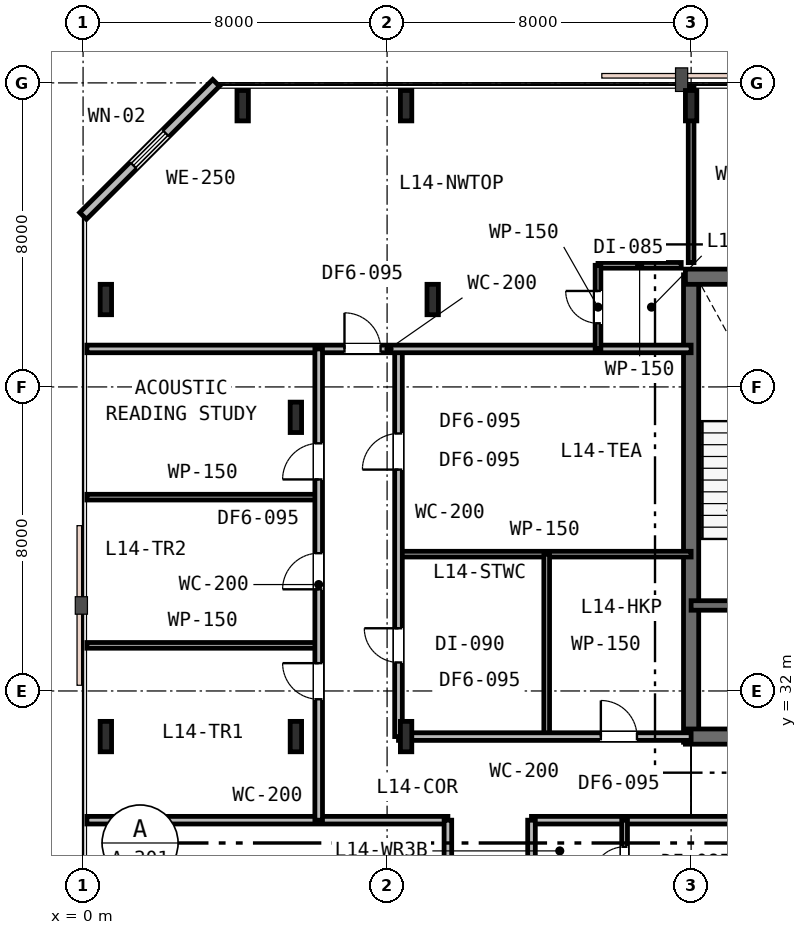
"""IFC4 building model, lengths in metres.
Left out: names, types, materials, properties, quantities, classifications, styles, units other than length and angle.
Written with IfcOpenShell. Run it as: python <this file> out.ifc"""

import sys

from ifc_helpers import new_model, si_unit, direction, frame, frame_2d, origin, origin_2d, place, context, subcontext, project, spatial, rectangle, i_section, extrude, element, fill, save


model = new_model("IFC4")
c1 = context("Model", 3, precision=1e-05, world=origin(), true_north=direction((0.0, 1.0)))
c2 = subcontext(c1, "Body", "Model", "MODEL_VIEW")
j1 = project(units=[si_unit("LENGTHUNIT", "METRE"), si_unit("PLANEANGLEUNIT", "RADIAN")], contexts=[c1])
p1 = place(None, origin())
s1 = spatial("IfcSite", under=j1, at=p1, CompositionType="ELEMENT")
p2 = place(p1, origin())
s2 = spatial("IfcBuilding", under=s1, at=p2, CompositionType="ELEMENT")
p3 = place(p2, frame((0.0, 0.0, 58.2)))
s3 = spatial("IfcBuildingStorey", under=s2, at=p3, CompositionType="ELEMENT", Elevation=58.2)
p4 = place(p3, frame((16.0, 30.65, 0.0), z_axis=(0.0, 0.0, 1.0), x_axis=(0.0, 1.0, 0.0)))
e1 = element("IfcWall", 1, at=p4, inside=s3, PredefinedType="SHEAR", context=c2, shape_type="SweptSolid", body=[
    extrude(rectangle(XDim=12.3, YDim=0.4, at=frame_2d((6.15, 0.0))), origin(), (0.0, 0.0, 1.0), 3.6),
])
p5 = place(p3, frame((15.85, 42.9, 0.0), z_axis=(0.0, 0.0, 1.0), x_axis=(1.0, 0.0, 0.0)))
e2 = element("IfcWall", 2, at=p5, inside=s3, PredefinedType="SHEAR", context=c2, shape_type="SweptSolid", body=[
    extrude(rectangle(XDim=24.3, YDim=0.4, at=frame_2d((12.15, 0.0))), origin(), (0.0, 0.0, 1.0), 3.6),
])
p6 = place(p3, frame((15.85, 30.8, 0.0), z_axis=(0.0, 0.0, 1.0), x_axis=(1.0, 0.0, 0.0)))
e3 = element("IfcWall", 3, at=p6, inside=s3, PredefinedType="SHEAR", context=c2, shape_type="SweptSolid", body=[
    extrude(rectangle(XDim=11.2, YDim=0.4, at=frame_2d((5.6, 0.0))), origin(), (0.0, 0.0, 1.0), 3.6),
])
p7 = place(p6, frame((2.45, 0.0, 0.0)))
e4 = element("IfcOpeningElement", 4, at=p7, cuts=e3, PredefinedType="OPENING", context=c2, shape_type="SweptSolid", body=[
    extrude(rectangle(XDim=1.1, YDim=2.15, at=frame_2d((0.55, 1.075))), frame((0.0, 0.21, 0.0), z_axis=(0.0, -1.0, 0.0), x_axis=(1.0, 0.0, 0.0)), (0.0, 0.0, 1.0), 0.42),
])
p8 = place(p3, frame((16.0, 34.25, 0.0), z_axis=(0.0, 0.0, 1.0), x_axis=(1.0, 0.0, 0.0)))
e5 = element("IfcWall", 5, at=p8, inside=s3, PredefinedType="SHEAR", context=c2, shape_type="SweptSolid", body=[
    extrude(rectangle(XDim=6.05, YDim=0.25, at=frame_2d((3.025, 0.0))), origin(), (0.0, 0.0, 1.0), 3.6),
])
p9 = place(p8, frame((1.25, 0.0, 0.0)))
e6 = element("IfcOpeningElement", 6, at=p9, cuts=e5, PredefinedType="OPENING", context=c2, shape_type="SweptSolid", body=[
    extrude(rectangle(XDim=1.0, YDim=2.15, at=frame_2d((0.5, 1.075))), frame((0.0, 0.135, 0.0), z_axis=(0.0, -1.0, 0.0), x_axis=(1.0, 0.0, 0.0)), (0.0, 0.0, 1.0), 0.27),
])
p10 = place(p8, frame((4.2, 0.0, 0.0)))
e7 = element("IfcOpeningElement", 7, at=p10, cuts=e5, PredefinedType="OPENING", context=c2, shape_type="SweptSolid", body=[
    extrude(rectangle(XDim=1.1, YDim=2.15, at=frame_2d((0.55, 1.075))), frame((0.0, 0.135, 0.0), z_axis=(0.0, -1.0, 0.0), x_axis=(1.0, 0.0, 0.0)), (0.0, 0.0, 1.0), 0.27),
])
for number, where, z_axis, x_axis in (
    (8, (5.6, 30.8, 0.0), (0.0, 0.0, 1.0), (1.0, 0.0, 0.0)),
    (9, (5.6, 39.2, 0.0), (0.0, 0.0, 1.0), (1.0, 0.0, 0.0)),
    (10, (8.5, 30.8, 0.0), (0.0, 0.0, 1.0), (1.0, 0.0, 0.0)),
    (11, (9.2, 42.3, 0.0), (0.0, 0.0, 1.0), (1.0, 0.0, 0.0)),
    (12, (0.6, 30.8, 0.0), (0.0, 0.0, 1.0), (1.0, 0.0, 0.0)),
    (13, (0.6, 42.3, 0.0), (0.0, 0.0, 1.0), (1.0, 0.0, 0.0)),
    (14, (4.2, 47.4, 0.0), (0.0, 0.0, 1.0), (1.0, 0.0, 0.0)),
    (15, (8.5, 47.4, 0.0), (0.0, 0.0, 1.0), (1.0, 0.0, 0.0)),
    (16, (16.0, 47.4, 0.0), (0.0, 0.0, 1.0), (1.0, 0.0, 0.0)),
):
    element("IfcColumn", number, at=place(p3, frame(where, z_axis=z_axis, x_axis=x_axis)), inside=s3, PredefinedType="COLUMN", context=c2, shape_type="SweptSolid", body=[
        extrude(i_section(OverallWidth=0.3, OverallDepth=0.8, WebThickness=0.018, FlangeThickness=0.033, FilletRadius=0.03, at=origin_2d()), origin(), (0.0, 0.0, 1.0), 3.6),
    ])
p11 = place(p3, frame((3.5, 48.0, 0.0), z_axis=(0.0, 0.0, 1.0), x_axis=(-0.707106781187, -0.707106781187, 0.0)))
e17 = element("IfcWall", 17, at=p11, inside=s3, PredefinedType="STANDARD", context=c2, shape_type="SweptSolid", body=[
    extrude(rectangle(XDim=4.95, YDim=0.25, at=frame_2d((2.475, 0.0))), origin(), (0.0, 0.0, 1.0), 3.33),
])
p12 = place(p11, frame((1.875, 0.0, 0.85)))
e18 = element("IfcOpeningElement", 18, at=p12, cuts=e17, PredefinedType="OPENING", context=c2, shape_type="SweptSolid", body=[
    extrude(rectangle(XDim=1.2, YDim=1.6, at=frame_2d((0.6, 0.8))), frame((0.0, 0.135, 0.0), z_axis=(0.0, -1.0, 0.0), x_axis=(1.0, 0.0, 0.0)), (0.0, 0.0, 1.0), 0.27),
])
p13 = place(p3, frame((0.1, 28.6, 0.0), z_axis=(0.0, 0.0, 1.0), x_axis=(1.0, 0.0, 0.0)))
e19 = element("IfcWall", 19, at=p13, inside=s3, PredefinedType="PARTITIONING", context=c2, shape_type="SweptSolid", body=[
    extrude(rectangle(XDim=9.5, YDim=0.2, at=frame_2d((4.75, 0.0))), origin(), (0.0, 0.0, 1.0), 2.82),
])
p14 = place(p3, frame((11.8, 28.6, 0.0), z_axis=(0.0, 0.0, 1.0), x_axis=(1.0, 0.0, 0.0)))
e20 = element("IfcWall", 20, at=p14, inside=s3, PredefinedType="PARTITIONING", context=c2, shape_type="SweptSolid", body=[
    extrude(rectangle(XDim=38.6, YDim=0.2, at=frame_2d((19.3, 0.0))), origin(), (0.0, 0.0, 1.0), 2.82),
])
p15 = place(p14, frame((14.3, 0.0, 0.0)))
e21 = element("IfcOpeningElement", 21, at=p15, cuts=e20, PredefinedType="OPENING", context=c2, shape_type="SweptSolid", body=[
    extrude(rectangle(XDim=0.95, YDim=2.15, at=frame_2d((0.475, 1.075))), frame((0.0, 0.11, 0.0), z_axis=(0.0, -1.0, 0.0), x_axis=(1.0, 0.0, 0.0)), (0.0, 0.0, 1.0), 0.22),
])
p16 = place(p14, frame((22.075, 0.0, 0.0)))
e22 = element("IfcOpeningElement", 22, at=p16, cuts=e20, PredefinedType="OPENING", context=c2, shape_type="SweptSolid", body=[
    extrude(rectangle(XDim=0.95, YDim=2.15, at=frame_2d((0.475, 1.075))), frame((0.0, 0.11, 0.0), z_axis=(0.0, -1.0, 0.0), x_axis=(1.0, 0.0, 0.0)), (0.0, 0.0, 1.0), 0.22),
])
p17 = place(p14, frame((28.829, 0.0, 0.0)))
e23 = element("IfcOpeningElement", 23, at=p17, cuts=e20, PredefinedType="OPENING", context=c2, shape_type="SweptSolid", body=[
    extrude(rectangle(XDim=0.95, YDim=2.15, at=frame_2d((0.475, 1.075))), frame((0.0, 0.11, 0.0), z_axis=(0.0, -1.0, 0.0), x_axis=(1.0, 0.0, 0.0)), (0.0, 0.0, 1.0), 0.22),
])
p18 = place(p14, frame((34.669, 0.0, 0.0)))
e24 = element("IfcOpeningElement", 24, at=p18, cuts=e20, PredefinedType="OPENING", context=c2, shape_type="SweptSolid", body=[
    extrude(rectangle(XDim=0.95, YDim=2.15, at=frame_2d((0.475, 1.075))), frame((0.0, 0.11, 0.0), z_axis=(0.0, -1.0, 0.0), x_axis=(1.0, 0.0, 0.0)), (0.0, 0.0, 1.0), 0.22),
])
p19 = place(p3, frame((8.3, 35.6, 0.0), z_axis=(0.0, 0.0, 1.0), x_axis=(1.0, 0.0, 0.0)))
e25 = element("IfcWall", 25, at=p19, inside=s3, PredefinedType="PARTITIONING", context=c2, shape_type="SweptSolid", body=[
    extrude(rectangle(XDim=7.7, YDim=0.15, at=frame_2d((3.85, 0.0))), origin(), (0.0, 0.0, 1.0), 2.82),
])
p20 = place(p3, frame((12.2, 30.8, 0.0), z_axis=(0.0, 0.0, 1.0), x_axis=(0.0, 1.0, 0.0)))
e26 = element("IfcWall", 26, at=p20, inside=s3, PredefinedType="PARTITIONING", context=c2, shape_type="SweptSolid", body=[
    extrude(rectangle(XDim=4.8, YDim=0.15, at=frame_2d((2.4, 0.0))), origin(), (0.0, 0.0, 1.0), 2.82),
])
p21 = place(p3, frame((8.3, 30.8, 0.0), z_axis=(0.0, 0.0, 1.0), x_axis=(1.0, 0.0, 0.0)))
e27 = element("IfcWall", 27, at=p21, inside=s3, PredefinedType="PARTITIONING", context=c2, shape_type="SweptSolid", body=[
    extrude(rectangle(XDim=7.7, YDim=0.2, at=frame_2d((3.85, 0.0))), origin(), (0.0, 0.0, 1.0), 2.82),
])
p22 = place(p21, frame((5.325, 0.0, 0.0)))
e28 = element("IfcOpeningElement", 28, at=p22, cuts=e27, PredefinedType="OPENING", context=c2, shape_type="SweptSolid", body=[
    extrude(rectangle(XDim=0.95, YDim=2.15, at=frame_2d((0.475, 1.075))), frame((0.0, 0.11, 0.0), z_axis=(0.0, -1.0, 0.0), x_axis=(1.0, 0.0, 0.0)), (0.0, 0.0, 1.0), 0.22),
])
p23 = place(p3, frame((8.3, 30.8, 0.0), z_axis=(0.0, 0.0, 1.0), x_axis=(0.0, 1.0, 0.0)))
e29 = element("IfcWall", 29, at=p23, inside=s3, PredefinedType="PARTITIONING", context=c2, shape_type="SweptSolid", body=[
    extrude(rectangle(XDim=10.2, YDim=0.2, at=frame_2d((5.1, 0.0))), origin(), (0.0, 0.0, 1.0), 2.82),
])
p24 = place(p23, frame((1.95, 0.0, 0.0)))
e30 = element("IfcOpeningElement", 30, at=p24, cuts=e29, PredefinedType="OPENING", context=c2, shape_type="SweptSolid", body=[
    extrude(rectangle(XDim=0.9, YDim=2.15, at=frame_2d((0.45, 1.075))), frame((0.0, 0.11, 0.0), z_axis=(0.0, -1.0, 0.0), x_axis=(1.0, 0.0, 0.0)), (0.0, 0.0, 1.0), 0.22),
])
p25 = place(p23, frame((7.025, 0.0, 0.0)))
e31 = element("IfcOpeningElement", 31, at=p25, cuts=e29, PredefinedType="OPENING", context=c2, shape_type="SweptSolid", body=[
    extrude(rectangle(XDim=0.95, YDim=2.15, at=frame_2d((0.475, 1.075))), frame((0.0, 0.11, 0.0), z_axis=(0.0, -1.0, 0.0), x_axis=(1.0, 0.0, 0.0)), (0.0, 0.0, 1.0), 0.22),
])
p26 = place(p3, frame((0.1, 41.0, 0.0), z_axis=(0.0, 0.0, 1.0), x_axis=(1.0, 0.0, 0.0)))
e32 = element("IfcWall", 32, at=p26, inside=s3, PredefinedType="PARTITIONING", context=c2, shape_type="SweptSolid", body=[
    extrude(rectangle(XDim=15.9, YDim=0.2, at=frame_2d((7.95, 0.0))), origin(), (0.0, 0.0, 1.0), 2.82),
])
p27 = place(p26, frame((6.779, 0.0, 0.0)))
e33 = element("IfcOpeningElement", 33, at=p27, cuts=e32, PredefinedType="OPENING", context=c2, shape_type="SweptSolid", body=[
    extrude(rectangle(XDim=0.95, YDim=2.15, at=frame_2d((0.475, 1.075))), frame((0.0, 0.11, 0.0), z_axis=(0.0, -1.0, 0.0), x_axis=(1.0, 0.0, 0.0)), (0.0, 0.0, 1.0), 0.22),
])
p28 = place(p3, frame((13.55, 43.2, 0.0), z_axis=(0.0, 0.0, 1.0), x_axis=(1.0, 0.0, 0.0)))
e34 = element("IfcWall", 34, at=p28, inside=s3, PredefinedType="PARTITIONING", context=c2, shape_type="SweptSolid", body=[
    extrude(rectangle(XDim=2.19, YDim=0.15, at=frame_2d((1.095, 0.0))), origin(), (0.0, 0.0, 1.0), 3.33),
])
p29 = place(p3, frame((13.55, 41.0, 0.0), z_axis=(0.0, 0.0, 1.0), x_axis=(0.0, 1.0, 0.0)))
e35 = element("IfcWall", 35, at=p29, inside=s3, PredefinedType="PARTITIONING", context=c2, shape_type="SweptSolid", body=[
    extrude(rectangle(XDim=2.2, YDim=0.15, at=frame_2d((1.1, 0.0))), origin(), (0.0, 0.0, 1.0), 3.33),
])
p30 = place(p29, frame((0.675, 0.0, 0.0)))
e36 = element("IfcOpeningElement", 36, at=p30, cuts=e35, PredefinedType="OPENING", context=c2, shape_type="SweptSolid", body=[
    extrude(rectangle(XDim=0.85, YDim=2.15, at=frame_2d((0.425, 1.075))), frame((0.0, 0.085, 0.0), z_axis=(0.0, -1.0, 0.0), x_axis=(1.0, 0.0, 0.0)), (0.0, 0.0, 1.0), 0.17),
])
for number, where, z_axis, x_axis in (
    (37, (0.1, 33.2, 0.0), (0.0, 0.0, 1.0), (1.0, 0.0, 0.0)),
    (38, (0.1, 37.1, 0.0), (0.0, 0.0, 1.0), (1.0, 0.0, 0.0)),
):
    element("IfcWall", number, at=place(p3, frame(where, z_axis=z_axis, x_axis=x_axis)), inside=s3, PredefinedType="PARTITIONING", context=c2, shape_type="SweptSolid", body=[
        extrude(rectangle(XDim=6.1, YDim=0.15, at=frame_2d((3.05, 0.0))), origin(), (0.0, 0.0, 1.0), 2.82),
    ])
p31 = place(p3, frame((6.2, 28.6, 0.0), z_axis=(0.0, 0.0, 1.0), x_axis=(0.0, 1.0, 0.0)))
e39 = element("IfcWall", 39, at=p31, inside=s3, PredefinedType="PARTITIONING", context=c2, shape_type="SweptSolid", body=[
    extrude(rectangle(XDim=12.4, YDim=0.2, at=frame_2d((6.2, 0.0))), origin(), (0.0, 0.0, 1.0), 2.82),
])
p32 = place(p31, frame((3.182, 0.0, 0.0)))
e40 = element("IfcOpeningElement", 40, at=p32, cuts=e39, PredefinedType="OPENING", context=c2, shape_type="SweptSolid", body=[
    extrude(rectangle(XDim=0.95, YDim=2.15, at=frame_2d((0.475, 1.075))), frame((0.0, 0.11, 0.0), z_axis=(0.0, -1.0, 0.0), x_axis=(1.0, 0.0, 0.0)), (0.0, 0.0, 1.0), 0.22),
])
p33 = place(p31, frame((6.075, 0.0, 0.0)))
e41 = element("IfcOpeningElement", 41, at=p33, cuts=e39, PredefinedType="OPENING", context=c2, shape_type="SweptSolid", body=[
    extrude(rectangle(XDim=0.95, YDim=2.15, at=frame_2d((0.475, 1.075))), frame((0.0, 0.11, 0.0), z_axis=(0.0, -1.0, 0.0), x_axis=(1.0, 0.0, 0.0)), (0.0, 0.0, 1.0), 0.22),
])
p34 = place(p31, frame((8.966, 0.0, 0.0)))
e42 = element("IfcOpeningElement", 42, at=p34, cuts=e39, PredefinedType="OPENING", context=c2, shape_type="SweptSolid", body=[
    extrude(rectangle(XDim=0.95, YDim=2.15, at=frame_2d((0.475, 1.075))), frame((0.0, 0.11, 0.0), z_axis=(0.0, -1.0, 0.0), x_axis=(1.0, 0.0, 0.0)), (0.0, 0.0, 1.0), 0.22),
])
p35 = place(p3, frame((16.0, 43.27, 0.0), z_axis=(0.0, 0.0, 1.0), x_axis=(0.0, 1.0, 0.0)))
e43 = element("IfcWall", 43, at=p35, inside=s3, PredefinedType="PARTITIONING", context=c2, shape_type="SweptSolid", body=[
    extrude(rectangle(XDim=4.63, YDim=0.15, at=frame_2d((2.315, 0.0))), origin(), (0.0, 0.0, 1.0), 2.93),
])
p36 = place(p3, frame((9.6, 5.6, 0.0), z_axis=(0.0, 0.0, 1.0), x_axis=(0.0, 1.0, 0.0)))
e44 = element("IfcWall", 44, at=p36, inside=s3, PredefinedType="PARTITIONING", context=c2, shape_type="SweptSolid", body=[
    extrude(rectangle(XDim=23.0, YDim=0.2, at=frame_2d((11.5, 0.0))), origin(), (0.0, 0.0, 1.0), 2.82),
])
p37 = place(p36, frame((4.27, 0.0, 0.0)))
e45 = element("IfcOpeningElement", 45, at=p37, cuts=e44, PredefinedType="OPENING", context=c2, shape_type="SweptSolid", body=[
    extrude(rectangle(XDim=0.95, YDim=2.15, at=frame_2d((0.475, 1.075))), frame((0.0, 0.11, 0.0), z_axis=(0.0, -1.0, 0.0), x_axis=(1.0, 0.0, 0.0)), (0.0, 0.0, 1.0), 0.22),
])
p38 = place(p36, frame((10.17, 0.0, 0.0)))
e46 = element("IfcOpeningElement", 46, at=p38, cuts=e44, PredefinedType="OPENING", context=c2, shape_type="SweptSolid", body=[
    extrude(rectangle(XDim=0.95, YDim=2.15, at=frame_2d((0.475, 1.075))), frame((0.0, 0.11, 0.0), z_axis=(0.0, -1.0, 0.0), x_axis=(1.0, 0.0, 0.0)), (0.0, 0.0, 1.0), 0.22),
])
p39 = place(p36, frame((19.693, 0.0, 0.0)))
e47 = element("IfcOpeningElement", 47, at=p39, cuts=e44, PredefinedType="OPENING", context=c2, shape_type="SweptSolid", body=[
    extrude(rectangle(XDim=0.95, YDim=2.15, at=frame_2d((0.475, 1.075))), frame((0.0, 0.11, 0.0), z_axis=(0.0, -1.0, 0.0), x_axis=(1.0, 0.0, 0.0)), (0.0, 0.0, 1.0), 0.22),
])
p40 = place(p3, frame((11.8, 5.6, 0.0), z_axis=(0.0, 0.0, 1.0), x_axis=(0.0, 1.0, 0.0)))
e48 = element("IfcWall", 48, at=p40, inside=s3, PredefinedType="PARTITIONING", context=c2, shape_type="SweptSolid", body=[
    extrude(rectangle(XDim=23.0, YDim=0.2, at=frame_2d((11.5, 0.0))), origin(), (0.0, 0.0, 1.0), 2.82),
])
p41 = place(p40, frame((2.19, 0.0, 0.0)))
e49 = element("IfcOpeningElement", 49, at=p41, cuts=e48, PredefinedType="OPENING", context=c2, shape_type="SweptSolid", body=[
    extrude(rectangle(XDim=0.95, YDim=2.15, at=frame_2d((0.475, 1.075))), frame((0.0, 0.11, 0.0), z_axis=(0.0, -1.0, 0.0), x_axis=(1.0, 0.0, 0.0)), (0.0, 0.0, 1.0), 0.22),
])
p42 = place(p40, frame((9.92, 0.0, 0.0)))
e50 = element("IfcOpeningElement", 50, at=p42, cuts=e48, PredefinedType="OPENING", context=c2, shape_type="SweptSolid", body=[
    extrude(rectangle(XDim=0.95, YDim=2.15, at=frame_2d((0.475, 1.075))), frame((0.0, 0.11, 0.0), z_axis=(0.0, -1.0, 0.0), x_axis=(1.0, 0.0, 0.0)), (0.0, 0.0, 1.0), 0.22),
])
p43 = place(p40, frame((17.41, 0.0, 0.0)))
e51 = element("IfcOpeningElement", 51, at=p43, cuts=e48, PredefinedType="OPENING", context=c2, shape_type="SweptSolid", body=[
    extrude(rectangle(XDim=0.95, YDim=2.15, at=frame_2d((0.475, 1.075))), frame((0.0, 0.11, 0.0), z_axis=(0.0, -1.0, 0.0), x_axis=(1.0, 0.0, 0.0)), (0.0, 0.0, 1.0), 0.22),
])
p44 = place(p3, frame((14.25, 26.35, 0.0), z_axis=(0.0, 0.0, 1.0), x_axis=(0.0, 1.0, 0.0)))
e52 = element("IfcWall", 52, at=p44, inside=s3, PredefinedType="PARTITIONING", context=c2, shape_type="SweptSolid", body=[
    extrude(rectangle(XDim=2.25, YDim=0.15, at=frame_2d((1.125, 0.0))), origin(), (0.0, 0.0, 1.0), 3.33),
])
p45 = place(p44, frame((0.7, 0.0, 0.0)))
e53 = element("IfcOpeningElement", 53, at=p45, cuts=e52, PredefinedType="OPENING", context=c2, shape_type="SweptSolid", body=[
    extrude(rectangle(XDim=0.85, YDim=2.15, at=frame_2d((0.425, 1.075))), frame((0.0, 0.085, 0.0), z_axis=(0.0, -1.0, 0.0), x_axis=(1.0, 0.0, 0.0)), (0.0, 0.0, 1.0), 0.17),
])
p46 = place(p12, origin())
e54 = element("IfcWindow", 54, at=p46, inside=s3, PartitioningType="SINGLE_PANEL", PredefinedType="WINDOW", context=c2, shape_type="SweptSolid", body=[
    extrude(rectangle(XDim=1.2, YDim=1.6, at=frame_2d((0.6, 0.8))), frame((0.0, 0.03, 0.0), z_axis=(0.0, -1.0, 0.0), x_axis=(1.0, 0.0, 0.0)), (0.0, 0.0, 1.0), 0.06),
])
fill(e18, e54)
p47 = place(p22, origin())
e55 = element("IfcDoor", 55, at=p47, inside=s3, OperationType="SINGLE_SWING_LEFT", PredefinedType="DOOR", context=c2, shape_type="SweptSolid", body=[
    extrude(rectangle(XDim=0.95, YDim=2.15, at=frame_2d((0.475, 1.075))), frame((0.0, 0.025, 0.0), z_axis=(0.0, -1.0, 0.0), x_axis=(1.0, 0.0, 0.0)), (0.0, 0.0, 1.0), 0.05),
])
fill(e28, e55)
p48 = place(p24, origin())
e56 = element("IfcDoor", 56, at=p48, inside=s3, OperationType="SINGLE_SWING_RIGHT", PredefinedType="DOOR", context=c2, shape_type="SweptSolid", body=[
    extrude(rectangle(XDim=0.9, YDim=2.15, at=frame_2d((0.45, 1.075))), frame((0.0, 0.025, 0.0), z_axis=(0.0, -1.0, 0.0), x_axis=(1.0, 0.0, 0.0)), (0.0, 0.0, 1.0), 0.05),
])
fill(e30, e56)
p49 = place(p27, origin())
e57 = element("IfcDoor", 57, at=p49, inside=s3, OperationType="SINGLE_SWING_LEFT", PredefinedType="DOOR", context=c2, shape_type="SweptSolid", body=[
    extrude(rectangle(XDim=0.95, YDim=2.15, at=frame_2d((0.475, 1.075))), frame((0.0, 0.025, 0.0), z_axis=(0.0, -1.0, 0.0), x_axis=(1.0, 0.0, 0.0)), (0.0, 0.0, 1.0), 0.05),
])
fill(e33, e57)
p50 = place(p30, origin())
e58 = element("IfcDoor", 58, at=p50, inside=s3, OperationType="SINGLE_SWING_RIGHT", PredefinedType="DOOR", context=c2, shape_type="SweptSolid", body=[
    extrude(rectangle(XDim=0.85, YDim=2.15, at=frame_2d((0.425, 1.075))), frame((0.0, 0.025, 0.0), z_axis=(0.0, -1.0, 0.0), x_axis=(1.0, 0.0, 0.0)), (0.0, 0.0, 1.0), 0.05),
])
fill(e36, e58)
p51 = place(p32, origin())
e59 = element("IfcDoor", 59, at=p51, inside=s3, OperationType="SINGLE_SWING_RIGHT", PredefinedType="DOOR", context=c2, shape_type="SweptSolid", body=[
    extrude(rectangle(XDim=0.95, YDim=2.15, at=frame_2d((0.475, 1.075))), frame((0.0, 0.025, 0.0), z_axis=(0.0, -1.0, 0.0), x_axis=(1.0, 0.0, 0.0)), (0.0, 0.0, 1.0), 0.05),
])
fill(e40, e59)
p52 = place(p33, origin())
e60 = element("IfcDoor", 60, at=p52, inside=s3, OperationType="SINGLE_SWING_LEFT", PredefinedType="DOOR", context=c2, shape_type="SweptSolid", body=[
    extrude(rectangle(XDim=0.95, YDim=2.15, at=frame_2d((0.475, 1.075))), frame((0.0, 0.025, 0.0), z_axis=(0.0, -1.0, 0.0), x_axis=(1.0, 0.0, 0.0)), (0.0, 0.0, 1.0), 0.05),
])
fill(e41, e60)
p53 = place(p34, origin())
e61 = element("IfcDoor", 61, at=p53, inside=s3, OperationType="SINGLE_SWING_LEFT", PredefinedType="DOOR", context=c2, shape_type="SweptSolid", body=[
    extrude(rectangle(XDim=0.95, YDim=2.15, at=frame_2d((0.475, 1.075))), frame((0.0, 0.025, 0.0), z_axis=(0.0, -1.0, 0.0), x_axis=(1.0, 0.0, 0.0)), (0.0, 0.0, 1.0), 0.05),
])
fill(e42, e61)
p54 = place(p25, origin())
e62 = element("IfcDoor", 62, at=p54, inside=s3, OperationType="SINGLE_SWING_LEFT", PredefinedType="DOOR", context=c2, shape_type="SweptSolid", body=[
    extrude(rectangle(XDim=0.95, YDim=2.15, at=frame_2d((0.475, 1.075))), frame((0.0, 0.025, 0.0), z_axis=(0.0, -1.0, 0.0), x_axis=(1.0, 0.0, 0.0)), (0.0, 0.0, 1.0), 0.05),
])
fill(e31, e62)
p55 = place(p45, origin())
e63 = element("IfcDoor", 63, at=p55, inside=s3, OperationType="SINGLE_SWING_LEFT", PredefinedType="DOOR", context=c2, shape_type="SweptSolid", body=[
    extrude(rectangle(XDim=0.85, YDim=2.15, at=frame_2d((0.425, 1.075))), frame((0.0, 0.025, 0.0), z_axis=(0.0, -1.0, 0.0), x_axis=(1.0, 0.0, 0.0)), (0.0, 0.0, 1.0), 0.05),
])
fill(e53, e63)
save(model, sys.argv[1])
